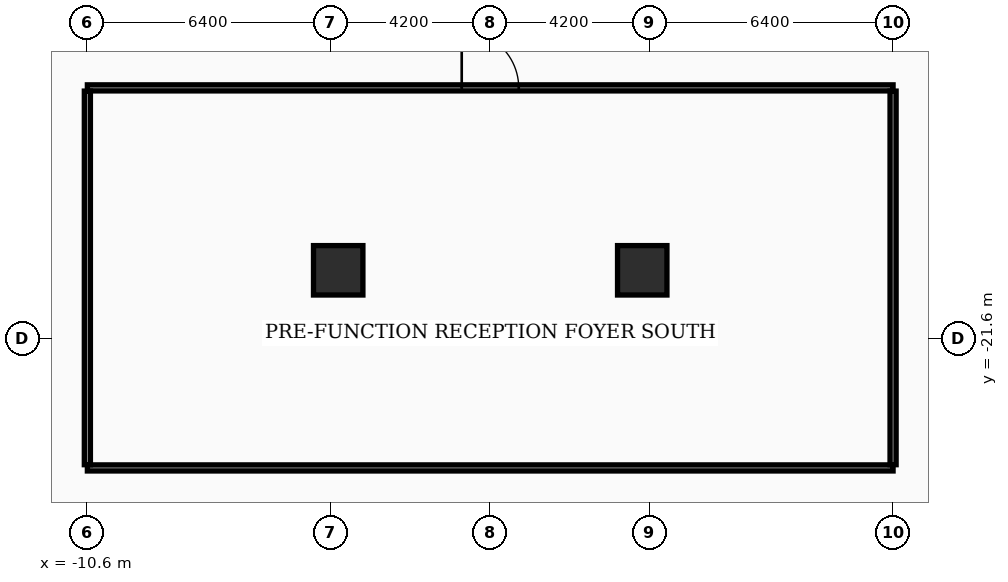
"""IFC4 building model, lengths in metres.
Left out: names, types, materials, properties, quantities, classifications, styles, units other than length and angle.
Written with IfcOpenShell. Run it as: python <this file> out.ifc"""

import sys

from ifc_helpers import new_model, si_unit, direction, frame, frame_2d, origin, origin_2d, place, context, subcontext, project, spatial, rectangle, extrude, element, fill, save


model = new_model("IFC4")
c1 = context("Model", 3, precision=1e-05, world=origin(), true_north=direction((0.0, 1.0)))
c2 = subcontext(c1, "Body", "Model", "MODEL_VIEW")
j1 = project(units=[si_unit("LENGTHUNIT", "METRE"), si_unit("PLANEANGLEUNIT", "RADIAN")], contexts=[c1])
p1 = place(None, origin())
s1 = spatial("IfcSite", under=j1, at=p1, CompositionType="ELEMENT")
p2 = place(p1, origin())
s2 = spatial("IfcBuilding", under=s1, at=p2, CompositionType="ELEMENT")
p3 = place(p2, frame((0.0, 0.0, 5.4)))
s3 = spatial("IfcBuildingStorey", under=s2, at=p3, CompositionType="ELEMENT", Elevation=5.4)
for number, where, z_axis, x_axis in (
    (1, (-4.0, -19.8, 0.0), (0.0, 0.0, 1.0), (1.0, 0.0, 0.0)),
    (2, (4.0, -19.8, 0.0), (0.0, 0.0, 1.0), (1.0, 0.0, 0.0)),
):
    element("IfcColumn", number, at=place(p3, frame(where, z_axis=z_axis, x_axis=x_axis)), inside=s3, PredefinedType="COLUMN", context=c2, shape_type="SweptSolid", body=[
        extrude(rectangle(XDim=1.3, YDim=1.3, at=origin_2d()), origin(), (0.0, 0.0, 1.0), 4.8),
    ])
p4 = place(p3, frame((-10.6, -25.0, 0.0), z_axis=(0.0, 0.0, 1.0), x_axis=(1.0, 0.0, 0.0)))
e3 = element("IfcWall", 3, at=p4, inside=s3, PredefinedType="PARTITIONING", context=c2, shape_type="SweptSolid", body=[
    extrude(rectangle(XDim=21.2, YDim=0.16, at=frame_2d((10.6, 0.0))), origin(), (0.0, 0.0, 1.0), 3.62),
])
p5 = place(p3, frame((-10.6, -15.0, 0.0), z_axis=(0.0, 0.0, 1.0), x_axis=(1.0, 0.0, 0.0)))
e4 = element("IfcWall", 4, at=p5, inside=s3, PredefinedType="PARTITIONING", context=c2, shape_type="SweptSolid", body=[
    extrude(rectangle(XDim=21.2, YDim=0.16, at=frame_2d((10.6, 0.0))), origin(), (0.0, 0.0, 1.0), 3.62),
])
p6 = place(p5, frame((9.85, 0.0, 0.0)))
e5 = element("IfcOpeningElement", 5, at=p6, cuts=e4, PredefinedType="OPENING", context=c2, shape_type="SweptSolid", body=[
    extrude(rectangle(XDim=1.5, YDim=2.15, at=frame_2d((0.75, 1.075))), frame((0.0, 0.09, 0.0), z_axis=(0.0, -1.0, 0.0), x_axis=(1.0, 0.0, 0.0)), (0.0, 0.0, 1.0), 0.18),
])
for number, where, z_axis, x_axis in (
    (6, (-10.6, -24.915, 0.0), (0.0, 0.0, 1.0), (0.0, 1.0, 0.0)),
    (7, (10.6, -24.915, 0.0), (0.0, 0.0, 1.0), (0.0, 1.0, 0.0)),
):
    element("IfcWall", number, at=place(p3, frame(where, z_axis=z_axis, x_axis=x_axis)), inside=s3, PredefinedType="PARTITIONING", context=c2, shape_type="SweptSolid", body=[
        extrude(rectangle(XDim=9.83, YDim=0.16, at=frame_2d((4.915, 0.0))), origin(), (0.0, 0.0, 1.0), 3.62),
    ])
p7 = place(p6, origin())
e8 = element("IfcDoor", 8, at=p7, inside=s3, OperationType="DOUBLE_DOOR_SINGLE_SWING", PredefinedType="DOOR", context=c2, shape_type="SweptSolid", body=[
    extrude(rectangle(XDim=1.5, YDim=2.15, at=frame_2d((0.75, 1.075))), frame((0.0, 0.025, 0.0), z_axis=(0.0, -1.0, 0.0), x_axis=(1.0, 0.0, 0.0)), (0.0, 0.0, 1.0), 0.05),
])
fill(e5, e8)
save(model, sys.argv[1])
